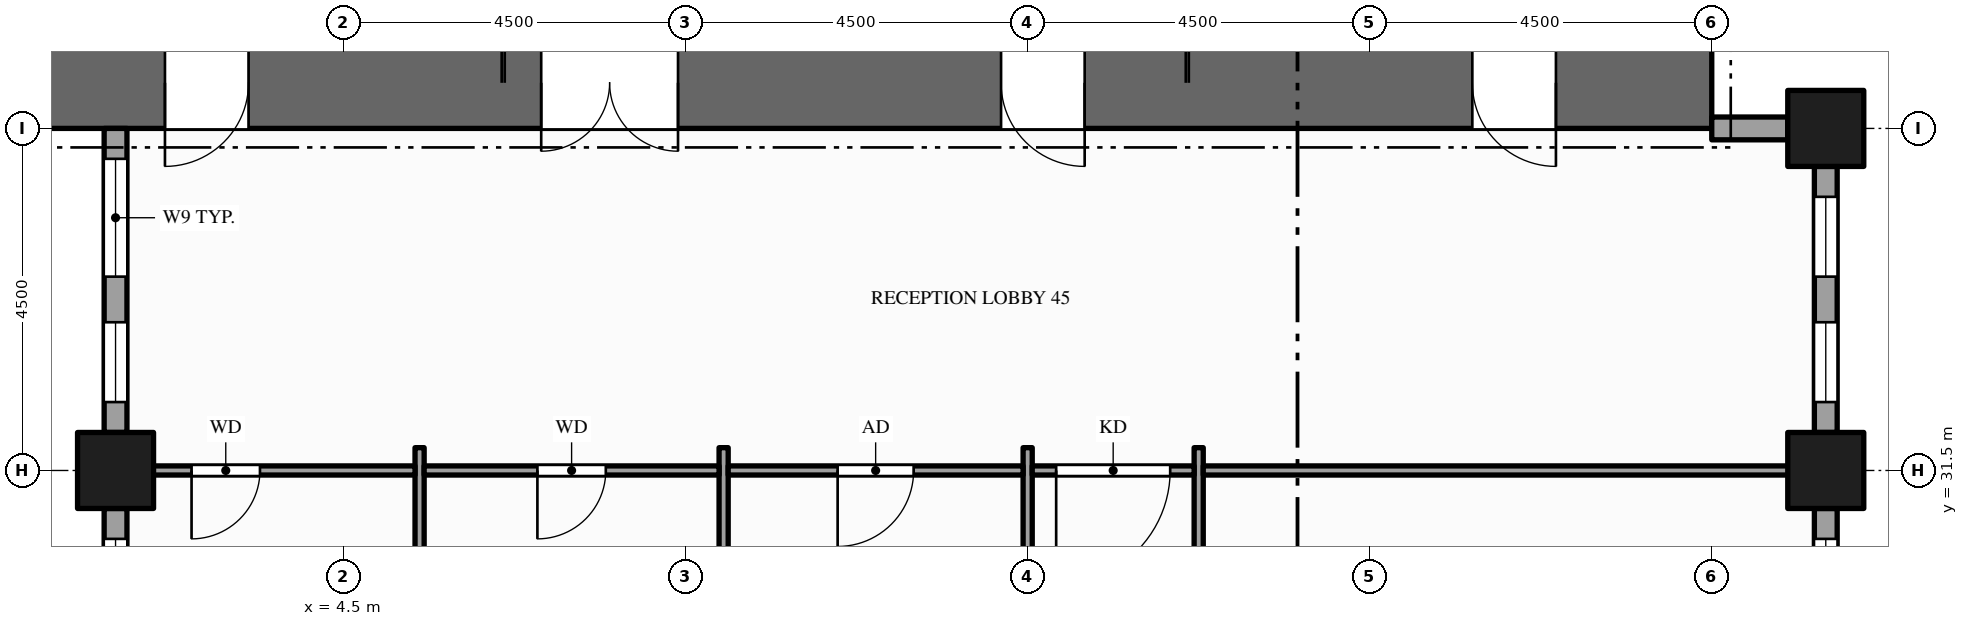
"""IFC4 building model, lengths in metres.
Left out: names, types, materials, properties, quantities, classifications, styles, units other than length and angle.
Written with IfcOpenShell. Run it as: python <this file> out.ifc"""

import sys

from ifc_helpers import new_model, si_unit, direction, frame, frame_2d, origin, origin_2d, place, context, subcontext, project, spatial, rectangle, hollow_rectangle, extrude, element, fill, save


model = new_model("IFC4")
c1 = context("Model", 3, precision=1e-05, world=origin(), true_north=direction((0.0, 1.0)))
c2 = subcontext(c1, "Body", "Model", "MODEL_VIEW")
j1 = project(units=[si_unit("LENGTHUNIT", "METRE"), si_unit("PLANEANGLEUNIT", "RADIAN")], contexts=[c1])
p1 = place(None, origin())
s1 = spatial("IfcSite", under=j1, at=p1, CompositionType="ELEMENT")
p2 = place(p1, origin())
s2 = spatial("IfcBuilding", under=s1, at=p2, CompositionType="ELEMENT")
p3 = place(p2, frame((0.0, 0.0, 115.0)))
s3 = spatial("IfcBuildingStorey", under=s2, at=p3, CompositionType="ELEMENT", Elevation=115.0)
p4 = place(p3, frame((0.0, 36.6, -0.15), z_axis=(0.0, 0.0, 1.0), x_axis=(1.0, 0.0, 0.0)))
e1 = element("IfcWall", 1, at=p4, inside=s3, PredefinedType="SHEAR", context=c2, shape_type="SweptSolid", body=[
    extrude(rectangle(XDim=22.5, YDim=1.2, at=frame_2d((11.25, 0.0))), origin(), (0.0, 0.0, 1.0), 4.0),
])
p5 = place(p4, frame((7.1, 0.0, 0.15)))
e2 = element("IfcOpeningElement", 2, at=p5, cuts=e1, PredefinedType="OPENING", context=c2, shape_type="SweptSolid", body=[
    extrude(rectangle(XDim=1.8, YDim=2.1, at=frame_2d((0.9, 1.05))), frame((0.0, 0.61, 0.0), z_axis=(0.0, -1.0, 0.0), x_axis=(1.0, 0.0, 0.0)), (0.0, 0.0, 1.0), 1.22),
])
p6 = place(p4, frame((13.15, 0.0, 0.15)))
e3 = element("IfcOpeningElement", 3, at=p6, cuts=e1, PredefinedType="OPENING", context=c2, shape_type="SweptSolid", body=[
    extrude(rectangle(XDim=1.1, YDim=2.1, at=frame_2d((0.55, 1.05))), frame((0.0, 0.61, 0.0), z_axis=(0.0, -1.0, 0.0), x_axis=(1.0, 0.0, 0.0)), (0.0, 0.0, 1.0), 1.22),
])
p7 = place(p4, frame((2.15, 0.0, 0.15)))
e4 = element("IfcOpeningElement", 4, at=p7, cuts=e1, PredefinedType="OPENING", context=c2, shape_type="SweptSolid", body=[
    extrude(rectangle(XDim=1.1, YDim=2.1, at=frame_2d((0.55, 1.05))), frame((0.0, 0.61, 0.0), z_axis=(0.0, -1.0, 0.0), x_axis=(1.0, 0.0, 0.0)), (0.0, 0.0, 1.0), 1.22),
])
p8 = place(p4, frame((19.35, 0.0, 0.15)))
e5 = element("IfcOpeningElement", 5, at=p8, cuts=e1, PredefinedType="OPENING", context=c2, shape_type="SweptSolid", body=[
    extrude(rectangle(XDim=1.1, YDim=2.1, at=frame_2d((0.55, 1.05))), frame((0.0, 0.61, 0.0), z_axis=(0.0, -1.0, 0.0), x_axis=(1.0, 0.0, 0.0)), (0.0, 0.0, 1.0), 1.22),
])
for number, where, z_axis, x_axis in (
    (6, (1.5, 31.5, -0.15), (0.0, 0.0, 1.0), (1.0, 0.0, 0.0)),
    (7, (24.0, 31.5, -0.15), (0.0, 0.0, 1.0), (1.0, 0.0, 0.0)),
    (8, (24.0, 36.0, -0.15), (0.0, 0.0, 1.0), (1.0, 0.0, 0.0)),
):
    element("IfcColumn", number, at=place(p3, frame(where, z_axis=z_axis, x_axis=x_axis)), inside=s3, PredefinedType="COLUMN", context=c2, shape_type="SweptSolid", body=[
        extrude(hollow_rectangle(XDim=1.0, YDim=1.0, WallThickness=0.05, at=origin_2d()), origin(), (0.0, 0.0, 1.0), 4.0),
    ])
p9 = place(p3, frame((24.0, 26.0, 0.0), z_axis=(0.0, 0.0, 1.0), x_axis=(0.0, 1.0, 0.0)))
e9 = element("IfcWall", 9, at=p9, inside=s3, PredefinedType="STANDARD", context=c2, shape_type="SweptSolid", body=[
    extrude(rectangle(XDim=5.0, YDim=0.3, at=frame_2d((2.5, 0.0))), origin(), (0.0, 0.0, 1.0), 3.154),
])
p10 = place(p9, frame((1.3, 0.0, 0.9)))
e10 = element("IfcOpeningElement", 10, at=p10, cuts=e9, PredefinedType="OPENING", context=c2, shape_type="SweptSolid", body=[
    extrude(rectangle(XDim=1.65, YDim=2.0, at=frame_2d((0.825, 1.0))), frame((0.0, 0.16, 0.0), z_axis=(0.0, -1.0, 0.0), x_axis=(1.0, 0.0, 0.0)), (0.0, 0.0, 1.0), 0.32),
])
p11 = place(p9, frame((3.55, 0.0, 0.9)))
e11 = element("IfcOpeningElement", 11, at=p11, cuts=e9, PredefinedType="OPENING", context=c2, shape_type="SweptSolid", body=[
    extrude(rectangle(XDim=1.05, YDim=2.0, at=frame_2d((0.525, 1.0))), frame((0.0, 0.16, 0.0), z_axis=(0.0, -1.0, 0.0), x_axis=(1.0, 0.0, 0.0)), (0.0, 0.0, 1.0), 0.32),
])
p12 = place(p3, frame((24.0, 32.0, 0.0), z_axis=(0.0, 0.0, 1.0), x_axis=(0.0, 1.0, 0.0)))
e12 = element("IfcWall", 12, at=p12, inside=s3, PredefinedType="STANDARD", context=c2, shape_type="SweptSolid", body=[
    extrude(rectangle(XDim=3.5, YDim=0.3, at=frame_2d((1.75, 0.0))), origin(), (0.0, 0.0, 1.0), 3.154),
])
p13 = place(p12, frame((0.4, 0.0, 0.9)))
e13 = element("IfcOpeningElement", 13, at=p13, cuts=e12, PredefinedType="OPENING", context=c2, shape_type="SweptSolid", body=[
    extrude(rectangle(XDim=1.05, YDim=2.0, at=frame_2d((0.525, 1.0))), frame((0.0, 0.16, 0.0), z_axis=(0.0, -1.0, 0.0), x_axis=(1.0, 0.0, 0.0)), (0.0, 0.0, 1.0), 0.32),
])
p14 = place(p12, frame((2.05, 0.0, 0.9)))
e14 = element("IfcOpeningElement", 14, at=p14, cuts=e12, PredefinedType="OPENING", context=c2, shape_type="SweptSolid", body=[
    extrude(rectangle(XDim=1.05, YDim=2.0, at=frame_2d((0.525, 1.0))), frame((0.0, 0.16, 0.0), z_axis=(0.0, -1.0, 0.0), x_axis=(1.0, 0.0, 0.0)), (0.0, 0.0, 1.0), 0.32),
])
p15 = place(p3, frame((23.5, 36.0, 0.0), z_axis=(0.0, 0.0, 1.0), x_axis=(-1.0, 0.0, 0.0)))
e15 = element("IfcWall", 15, at=p15, inside=s3, PredefinedType="STANDARD", context=c2, shape_type="SweptSolid", body=[
    extrude(rectangle(XDim=1.0, YDim=0.3, at=frame_2d((0.5, 0.0))), origin(), (0.0, 0.0, 1.0), 2.938),
])
p16 = place(p3, frame((1.5, 36.0, 0.0), z_axis=(0.0, 0.0, 1.0), x_axis=(0.0, -1.0, 0.0)))
e16 = element("IfcWall", 16, at=p16, inside=s3, PredefinedType="STANDARD", context=c2, shape_type="SweptSolid", body=[
    extrude(rectangle(XDim=4.0, YDim=0.3, at=frame_2d((2.0, 0.0))), origin(), (0.0, 0.0, 1.0), 3.154),
])
p17 = place(p16, frame((0.4, 0.0, 0.9)))
e17 = element("IfcOpeningElement", 17, at=p17, cuts=e16, PredefinedType="OPENING", context=c2, shape_type="SweptSolid", body=[
    extrude(rectangle(XDim=1.55, YDim=2.0, at=frame_2d((0.775, 1.0))), frame((0.0, 0.16, 0.0), z_axis=(0.0, -1.0, 0.0), x_axis=(1.0, 0.0, 0.0)), (0.0, 0.0, 1.0), 0.32),
])
p18 = place(p16, frame((2.55, 0.0, 0.9)))
e18 = element("IfcOpeningElement", 18, at=p18, cuts=e16, PredefinedType="OPENING", context=c2, shape_type="SweptSolid", body=[
    extrude(rectangle(XDim=1.05, YDim=2.0, at=frame_2d((0.525, 1.0))), frame((0.0, 0.16, 0.0), z_axis=(0.0, -1.0, 0.0), x_axis=(1.0, 0.0, 0.0)), (0.0, 0.0, 1.0), 0.32),
])
p19 = place(p3, frame((1.5, 31.0, 0.0), z_axis=(0.0, 0.0, 1.0), x_axis=(0.0, -1.0, 0.0)))
e19 = element("IfcWall", 19, at=p19, inside=s3, PredefinedType="STANDARD", context=c2, shape_type="SweptSolid", body=[
    extrude(rectangle(XDim=3.5, YDim=0.3, at=frame_2d((1.75, 0.0))), origin(), (0.0, 0.0, 1.0), 3.154),
])
p20 = place(p19, frame((0.4, 0.0, 0.9)))
e20 = element("IfcOpeningElement", 20, at=p20, cuts=e19, PredefinedType="OPENING", context=c2, shape_type="SweptSolid", body=[
    extrude(rectangle(XDim=1.05, YDim=2.0, at=frame_2d((0.525, 1.0))), frame((0.0, 0.16, 0.0), z_axis=(0.0, -1.0, 0.0), x_axis=(1.0, 0.0, 0.0)), (0.0, 0.0, 1.0), 0.32),
])
p21 = place(p19, frame((2.05, 0.0, 0.9)))
e21 = element("IfcOpeningElement", 21, at=p21, cuts=e19, PredefinedType="OPENING", context=c2, shape_type="SweptSolid", body=[
    extrude(rectangle(XDim=1.05, YDim=2.0, at=frame_2d((0.525, 1.0))), frame((0.0, 0.16, 0.0), z_axis=(0.0, -1.0, 0.0), x_axis=(1.0, 0.0, 0.0)), (0.0, 0.0, 1.0), 0.32),
])
for number, where, z_axis, x_axis in (
    (22, (5.5, 26.7, 0.0), (0.0, 0.0, 1.0), (0.0, 1.0, 0.0)),
    (23, (9.5, 26.7, 0.0), (0.0, 0.0, 1.0), (0.0, 1.0, 0.0)),
):
    element("IfcWall", number, at=place(p3, frame(where, z_axis=z_axis, x_axis=x_axis)), inside=s3, PredefinedType="PARTITIONING", context=c2, shape_type="SweptSolid", body=[
        extrude(rectangle(XDim=5.1, YDim=0.12, at=frame_2d((2.55, 0.0))), origin(), (0.0, 0.0, 1.0), 3.85),
    ])
p22 = place(p3, frame((13.5, 10.95, 0.0), z_axis=(0.0, 0.0, 1.0), x_axis=(0.0, 1.0, 0.0)))
e24 = element("IfcWall", 24, at=p22, inside=s3, PredefinedType="PARTITIONING", context=c2, shape_type="SweptSolid", body=[
    extrude(rectangle(XDim=20.85, YDim=0.12, at=frame_2d((10.425, 0.0))), origin(), (0.0, 0.0, 1.0), 2.6),
])
p23 = place(p22, frame((3.175, 0.0, 0.0)))
e25 = element("IfcOpeningElement", 25, at=p23, cuts=e24, PredefinedType="OPENING", context=c2, shape_type="SweptSolid", body=[
    extrude(rectangle(XDim=1.0, YDim=2.1, at=frame_2d((0.5, 1.05))), frame((0.0, 0.07, 0.0), z_axis=(0.0, -1.0, 0.0), x_axis=(1.0, 0.0, 0.0)), (0.0, 0.0, 1.0), 0.14),
])
p24 = place(p22, frame((10.68, 0.0, 0.0)))
e26 = element("IfcOpeningElement", 26, at=p24, cuts=e24, PredefinedType="OPENING", context=c2, shape_type="SweptSolid", body=[
    extrude(rectangle(XDim=1.8, YDim=2.1, at=frame_2d((0.9, 1.05))), frame((0.0, 0.07, 0.0), z_axis=(0.0, -1.0, 0.0), x_axis=(1.0, 0.0, 0.0)), (0.0, 0.0, 1.0), 0.14),
])
p25 = place(p3, frame((15.75, 10.95, 0.0), z_axis=(0.0, 0.0, 1.0), x_axis=(0.0, 1.0, 0.0)))
e27 = element("IfcWall", 27, at=p25, inside=s3, PredefinedType="PARTITIONING", context=c2, shape_type="SweptSolid", body=[
    extrude(rectangle(XDim=20.85, YDim=0.12, at=frame_2d((10.425, 0.0))), origin(), (0.0, 0.0, 1.0), 2.6),
])
p26 = place(p25, frame((17.8, 0.0, 0.0)))
e28 = element("IfcOpeningElement", 28, at=p26, cuts=e27, PredefinedType="OPENING", context=c2, shape_type="SweptSolid", body=[
    extrude(rectangle(XDim=1.0, YDim=2.1, at=frame_2d((0.5, 1.05))), frame((0.0, 0.07, 0.0), z_axis=(0.0, -1.0, 0.0), x_axis=(1.0, 0.0, 0.0)), (0.0, 0.0, 1.0), 0.14),
])
p27 = place(p25, frame((4.2, 0.0, 0.0)))
e29 = element("IfcOpeningElement", 29, at=p27, cuts=e27, PredefinedType="OPENING", context=c2, shape_type="SweptSolid", body=[
    extrude(rectangle(XDim=1.2, YDim=2.1, at=frame_2d((0.6, 1.05))), frame((0.0, 0.07, 0.0), z_axis=(0.0, -1.0, 0.0), x_axis=(1.0, 0.0, 0.0)), (0.0, 0.0, 1.0), 0.14),
])
p28 = place(p3, frame((1.65, 31.5, 0.0), z_axis=(0.0, 0.0, 1.0), x_axis=(1.0, 0.0, 0.0)))
e30 = element("IfcWall", 30, at=p28, inside=s3, PredefinedType="PARTITIONING", context=c2, shape_type="SweptSolid", body=[
    extrude(rectangle(XDim=3.79, YDim=0.12, at=frame_2d((1.895, 0.0))), origin(), (0.0, 0.0, 1.0), 2.938),
])
p29 = place(p28, frame((0.85, 0.0, 0.0)))
e31 = element("IfcOpeningElement", 31, at=p29, cuts=e30, PredefinedType="OPENING", context=c2, shape_type="SweptSolid", body=[
    extrude(rectangle(XDim=0.9, YDim=2.1, at=frame_2d((0.45, 1.05))), frame((0.0, 0.07, 0.0), z_axis=(0.0, -1.0, 0.0), x_axis=(1.0, 0.0, 0.0)), (0.0, 0.0, 1.0), 0.14),
])
p30 = place(p3, frame((5.56, 31.5, 0.0), z_axis=(0.0, 0.0, 1.0), x_axis=(1.0, 0.0, 0.0)))
e32 = element("IfcWall", 32, at=p30, inside=s3, PredefinedType="PARTITIONING", context=c2, shape_type="SweptSolid", body=[
    extrude(rectangle(XDim=3.88, YDim=0.12, at=frame_2d((1.94, 0.0))), origin(), (0.0, 0.0, 1.0), 2.938),
])
p31 = place(p30, frame((1.49, 0.0, 0.0)))
e33 = element("IfcOpeningElement", 33, at=p31, cuts=e32, PredefinedType="OPENING", context=c2, shape_type="SweptSolid", body=[
    extrude(rectangle(XDim=0.9, YDim=2.1, at=frame_2d((0.45, 1.05))), frame((0.0, 0.07, 0.0), z_axis=(0.0, -1.0, 0.0), x_axis=(1.0, 0.0, 0.0)), (0.0, 0.0, 1.0), 0.14),
])
p32 = place(p3, frame((9.56, 31.5, 0.0), z_axis=(0.0, 0.0, 1.0), x_axis=(1.0, 0.0, 0.0)))
e34 = element("IfcWall", 34, at=p32, inside=s3, PredefinedType="PARTITIONING", context=c2, shape_type="SweptSolid", body=[
    extrude(rectangle(XDim=3.88, YDim=0.12, at=frame_2d((1.94, 0.0))), origin(), (0.0, 0.0, 1.0), 2.938),
])
p33 = place(p32, frame((1.44, 0.0, 0.0)))
e35 = element("IfcOpeningElement", 35, at=p33, cuts=e34, PredefinedType="OPENING", context=c2, shape_type="SweptSolid", body=[
    extrude(rectangle(XDim=1.0, YDim=2.1, at=frame_2d((0.5, 1.05))), frame((0.0, 0.07, 0.0), z_axis=(0.0, -1.0, 0.0), x_axis=(1.0, 0.0, 0.0)), (0.0, 0.0, 1.0), 0.14),
])
p34 = place(p3, frame((13.56, 31.5, 0.0), z_axis=(0.0, 0.0, 1.0), x_axis=(1.0, 0.0, 0.0)))
e36 = element("IfcWall", 36, at=p34, inside=s3, PredefinedType="PARTITIONING", context=c2, shape_type="SweptSolid", body=[
    extrude(rectangle(XDim=2.13, YDim=0.12, at=frame_2d((1.065, 0.0))), origin(), (0.0, 0.0, 1.0), 2.938),
])
p35 = place(p34, frame((0.315, 0.0, 0.0)))
e37 = element("IfcOpeningElement", 37, at=p35, cuts=e36, PredefinedType="OPENING", context=c2, shape_type="SweptSolid", body=[
    extrude(rectangle(XDim=1.5, YDim=2.1, at=frame_2d((0.75, 1.05))), frame((0.0, 0.07, 0.0), z_axis=(0.0, -1.0, 0.0), x_axis=(1.0, 0.0, 0.0)), (0.0, 0.0, 1.0), 0.14),
])
p36 = place(p3, frame((15.81, 31.5, 0.0), z_axis=(0.0, 0.0, 1.0), x_axis=(1.0, 0.0, 0.0)))
e38 = element("IfcWall", 38, at=p36, inside=s3, PredefinedType="PARTITIONING", context=c2, shape_type="SweptSolid", body=[
    extrude(rectangle(XDim=8.04, YDim=0.12, at=frame_2d((4.02, 0.0))), origin(), (0.0, 0.0, 1.0), 2.938),
])
p37 = place(p11, origin())
e39 = element("IfcWindow", 39, at=p37, inside=s3, PartitioningType="SINGLE_PANEL", PredefinedType="WINDOW", context=c2, shape_type="SweptSolid", body=[
    extrude(rectangle(XDim=1.05, YDim=2.0, at=frame_2d((0.525, 1.0))), frame((0.0, 0.03, 0.0), z_axis=(0.0, -1.0, 0.0), x_axis=(1.0, 0.0, 0.0)), (0.0, 0.0, 1.0), 0.06),
])
fill(e11, e39)
p38 = place(p13, origin())
e40 = element("IfcWindow", 40, at=p38, inside=s3, PartitioningType="SINGLE_PANEL", PredefinedType="WINDOW", context=c2, shape_type="SweptSolid", body=[
    extrude(rectangle(XDim=1.05, YDim=2.0, at=frame_2d((0.525, 1.0))), frame((0.0, 0.03, 0.0), z_axis=(0.0, -1.0, 0.0), x_axis=(1.0, 0.0, 0.0)), (0.0, 0.0, 1.0), 0.06),
])
fill(e13, e40)
p39 = place(p14, origin())
e41 = element("IfcWindow", 41, at=p39, inside=s3, PartitioningType="SINGLE_PANEL", PredefinedType="WINDOW", context=c2, shape_type="SweptSolid", body=[
    extrude(rectangle(XDim=1.05, YDim=2.0, at=frame_2d((0.525, 1.0))), frame((0.0, 0.03, 0.0), z_axis=(0.0, -1.0, 0.0), x_axis=(1.0, 0.0, 0.0)), (0.0, 0.0, 1.0), 0.06),
])
fill(e14, e41)
p40 = place(p17, origin())
e42 = element("IfcWindow", 42, at=p40, inside=s3, PartitioningType="SINGLE_PANEL", PredefinedType="WINDOW", context=c2, shape_type="SweptSolid", body=[
    extrude(rectangle(XDim=1.55, YDim=2.0, at=frame_2d((0.775, 1.0))), frame((0.0, 0.03, 0.0), z_axis=(0.0, -1.0, 0.0), x_axis=(1.0, 0.0, 0.0)), (0.0, 0.0, 1.0), 0.06),
])
fill(e17, e42)
p41 = place(p18, origin())
e43 = element("IfcWindow", 43, at=p41, inside=s3, PartitioningType="SINGLE_PANEL", PredefinedType="WINDOW", context=c2, shape_type="SweptSolid", body=[
    extrude(rectangle(XDim=1.05, YDim=2.0, at=frame_2d((0.525, 1.0))), frame((0.0, 0.03, 0.0), z_axis=(0.0, -1.0, 0.0), x_axis=(1.0, 0.0, 0.0)), (0.0, 0.0, 1.0), 0.06),
])
fill(e18, e43)
p42 = place(p20, origin())
e44 = element("IfcWindow", 44, at=p42, inside=s3, PartitioningType="SINGLE_PANEL", PredefinedType="WINDOW", context=c2, shape_type="SweptSolid", body=[
    extrude(rectangle(XDim=1.05, YDim=2.0, at=frame_2d((0.525, 1.0))), frame((0.0, 0.03, 0.0), z_axis=(0.0, -1.0, 0.0), x_axis=(1.0, 0.0, 0.0)), (0.0, 0.0, 1.0), 0.06),
])
fill(e20, e44)
p43 = place(p5, origin())
e45 = element("IfcDoor", 45, at=p43, inside=s3, OperationType="DOUBLE_DOOR_SINGLE_SWING", PredefinedType="DOOR", context=c2, shape_type="SweptSolid", body=[
    extrude(rectangle(XDim=1.8, YDim=2.1, at=frame_2d((0.9, 1.05))), frame((0.0, 0.025, 0.0), z_axis=(0.0, -1.0, 0.0), x_axis=(1.0, 0.0, 0.0)), (0.0, 0.0, 1.0), 0.05),
])
fill(e2, e45)
p44 = place(p6, origin())
e46 = element("IfcDoor", 46, at=p44, inside=s3, OperationType="SINGLE_SWING_RIGHT", PredefinedType="DOOR", context=c2, shape_type="SweptSolid", body=[
    extrude(rectangle(XDim=1.1, YDim=2.1, at=frame_2d((0.55, 1.05))), frame((0.0, 0.025, 0.0), z_axis=(0.0, -1.0, 0.0), x_axis=(1.0, 0.0, 0.0)), (0.0, 0.0, 1.0), 0.05),
])
fill(e3, e46)
p45 = place(p7, origin())
e47 = element("IfcDoor", 47, at=p45, inside=s3, OperationType="SINGLE_SWING_LEFT", PredefinedType="DOOR", context=c2, shape_type="SweptSolid", body=[
    extrude(rectangle(XDim=1.1, YDim=2.1, at=frame_2d((0.55, 1.05))), frame((0.0, 0.025, 0.0), z_axis=(0.0, -1.0, 0.0), x_axis=(1.0, 0.0, 0.0)), (0.0, 0.0, 1.0), 0.05),
])
fill(e4, e47)
p46 = place(p8, origin())
e48 = element("IfcDoor", 48, at=p46, inside=s3, OperationType="SINGLE_SWING_RIGHT", PredefinedType="DOOR", context=c2, shape_type="SweptSolid", body=[
    extrude(rectangle(XDim=1.1, YDim=2.1, at=frame_2d((0.55, 1.05))), frame((0.0, 0.025, 0.0), z_axis=(0.0, -1.0, 0.0), x_axis=(1.0, 0.0, 0.0)), (0.0, 0.0, 1.0), 0.05),
])
fill(e5, e48)
p47 = place(p35, origin())
e49 = element("IfcDoor", 49, at=p47, inside=s3, OperationType="SINGLE_SWING_LEFT", PredefinedType="DOOR", context=c2, shape_type="SweptSolid", body=[
    extrude(rectangle(XDim=1.5, YDim=2.1, at=frame_2d((0.75, 1.05))), frame((0.0, 0.025, 0.0), z_axis=(0.0, -1.0, 0.0), x_axis=(1.0, 0.0, 0.0)), (0.0, 0.0, 1.0), 0.05),
])
fill(e37, e49)
p48 = place(p29, origin())
e50 = element("IfcDoor", 50, at=p48, inside=s3, OperationType="SINGLE_SWING_LEFT", PredefinedType="DOOR", context=c2, shape_type="SweptSolid", body=[
    extrude(rectangle(XDim=0.9, YDim=2.1, at=frame_2d((0.45, 1.05))), frame((0.0, 0.025, 0.0), z_axis=(0.0, -1.0, 0.0), x_axis=(1.0, 0.0, 0.0)), (0.0, 0.0, 1.0), 0.05),
])
fill(e31, e50)
p49 = place(p31, origin())
e51 = element("IfcDoor", 51, at=p49, inside=s3, OperationType="SINGLE_SWING_LEFT", PredefinedType="DOOR", context=c2, shape_type="SweptSolid", body=[
    extrude(rectangle(XDim=0.9, YDim=2.1, at=frame_2d((0.45, 1.05))), frame((0.0, 0.025, 0.0), z_axis=(0.0, -1.0, 0.0), x_axis=(1.0, 0.0, 0.0)), (0.0, 0.0, 1.0), 0.05),
])
fill(e33, e51)
p50 = place(p33, origin())
e52 = element("IfcDoor", 52, at=p50, inside=s3, OperationType="SINGLE_SWING_LEFT", PredefinedType="DOOR", context=c2, shape_type="SweptSolid", body=[
    extrude(rectangle(XDim=1.0, YDim=2.1, at=frame_2d((0.5, 1.05))), frame((0.0, 0.025, 0.0), z_axis=(0.0, -1.0, 0.0), x_axis=(1.0, 0.0, 0.0)), (0.0, 0.0, 1.0), 0.05),
])
fill(e35, e52)
save(model, sys.argv[1])
